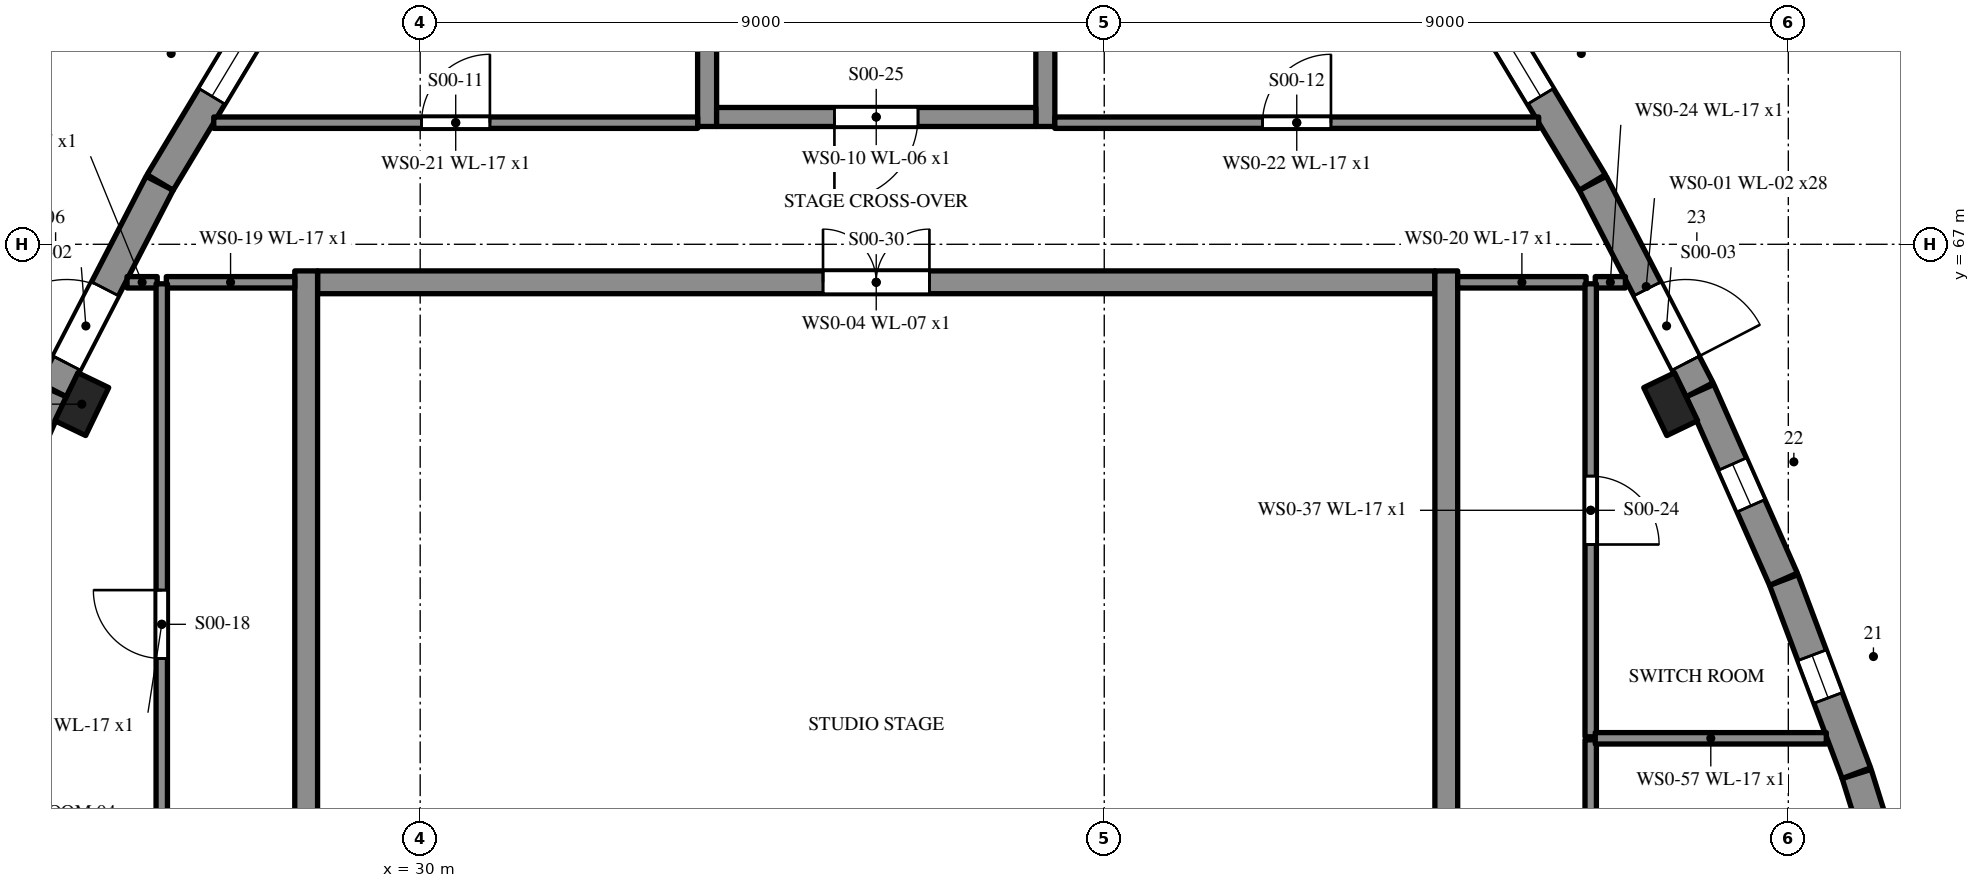
"""IFC4 building model, lengths in metres.
Left out: names, types, materials, properties, quantities, classifications, styles, units other than length and angle.
Written with IfcOpenShell. Run it as: python <this file> out.ifc"""

import sys

from ifc_helpers import new_model, si_unit, direction, frame, frame_2d, origin, origin_2d, place, context, subcontext, project, spatial, rectangle, extrude, element, fill, save


model = new_model("IFC4")
c1 = context("Model", 3, precision=1e-05, world=origin(), true_north=direction((0.0, 1.0)))
c2 = subcontext(c1, "Body", "Model", "MODEL_VIEW")
j1 = project(units=[si_unit("LENGTHUNIT", "METRE"), si_unit("PLANEANGLEUNIT", "RADIAN")], contexts=[c1])
p1 = place(None, origin())
s1 = spatial("IfcSite", under=j1, at=p1, CompositionType="ELEMENT")
p2 = place(p1, origin())
s2 = spatial("IfcBuilding", under=s1, at=p2, CompositionType="ELEMENT")
p3 = place(p2, origin())
s3 = spatial("IfcBuildingStorey", under=s2, at=p3, CompositionType="ELEMENT", Elevation=0.0)
p4 = place(p3, frame((49.708, 57.44, 0.0), z_axis=(0.0, 0.0, 1.0), x_axis=(-0.29795748067, 0.954579142718, 0.0)))
e1 = element("IfcWall", 1, at=p4, inside=s3, PredefinedType="SOLIDWALL", context=c2, shape_type="SweptSolid", body=[
    extrude(rectangle(XDim=2.715, YDim=0.4, at=frame_2d((1.357, 0.0))), origin(), (0.0, 0.0, 1.0), 5.1),
])
p5 = place(p4, frame((0.607, 0.0, 2.4)))
e2 = element("IfcOpeningElement", 2, at=p5, cuts=e1, PredefinedType="OPENING", context=c2, shape_type="SweptSolid", body=[
    extrude(rectangle(XDim=1.5, YDim=0.9, at=frame_2d((0.75, 0.45))), frame((0.0, 0.21, 0.0), z_axis=(0.0, -1.0, 0.0), x_axis=(1.0, 0.0, 0.0)), (0.0, 0.0, 1.0), 0.42),
])
p6 = place(p3, frame((48.896, 60.042, 0.0), z_axis=(0.0, 0.0, 1.0), x_axis=(-0.351862601417, 0.936051659752, 0.0)))
e3 = element("IfcWall", 3, at=p6, inside=s3, PredefinedType="SOLIDWALL", context=c2, shape_type="SweptSolid", body=[
    extrude(rectangle(XDim=2.714, YDim=0.4, at=frame_2d((1.357, 0.0))), origin(), (0.0, 0.0, 1.0), 5.1),
])
p7 = place(p6, frame((1.057, 0.0, 2.4)))
e4 = element("IfcOpeningElement", 4, at=p7, cuts=e3, PredefinedType="OPENING", context=c2, shape_type="SweptSolid", body=[
    extrude(rectangle(XDim=0.6, YDim=0.6, at=frame_2d((0.3, 0.3))), frame((0.0, 0.21, 0.0), z_axis=(0.0, -1.0, 0.0), x_axis=(1.0, 0.0, 0.0)), (0.0, 0.0, 1.0), 0.42),
])
p8 = place(p3, frame((47.936, 62.593, 0.0), z_axis=(0.0, 0.0, 1.0), x_axis=(-0.404652153757, 0.914470685402, 0.0)))
e5 = element("IfcWall", 5, at=p8, inside=s3, PredefinedType="SOLIDWALL", context=c2, shape_type="SweptSolid", body=[
    extrude(rectangle(XDim=2.714, YDim=0.4, at=frame_2d((1.357, 0.0))), origin(), (0.0, 0.0, 1.0), 5.1),
])
p9 = place(p8, frame((1.057, 0.0, 2.4)))
e6 = element("IfcOpeningElement", 6, at=p9, cuts=e5, PredefinedType="OPENING", context=c2, shape_type="SweptSolid", body=[
    extrude(rectangle(XDim=0.6, YDim=0.6, at=frame_2d((0.3, 0.3))), frame((0.0, 0.21, 0.0), z_axis=(0.0, -1.0, 0.0), x_axis=(1.0, 0.0, 0.0)), (0.0, 0.0, 1.0), 0.42),
])
p10 = place(p3, frame((46.833, 65.086, 0.0), z_axis=(0.0, 0.0, 1.0), x_axis=(-0.45930565039, 0.888278289457, 0.0)))
e7 = element("IfcWall", 7, at=p10, inside=s3, PredefinedType="SOLIDWALL", context=c2, shape_type="SweptSolid", body=[
    extrude(rectangle(XDim=3.059, YDim=0.4, at=frame_2d((1.529, 0.0))), origin(), (0.0, 0.0, 1.0), 5.1),
])
p11 = place(p10, frame((0.396, 0.0, 0.0)))
e8 = element("IfcOpeningElement", 8, at=p11, cuts=e7, PredefinedType="OPENING", context=c2, shape_type="SweptSolid", body=[
    extrude(rectangle(XDim=1.1, YDim=2.1, at=frame_2d((0.55, 1.05))), frame((0.0, 0.21, 0.0), z_axis=(0.0, -1.0, 0.0), x_axis=(1.0, 0.0, 0.0)), (0.0, 0.0, 1.0), 0.42),
])
p12 = place(p3, frame((45.422, 67.814, 0.0), z_axis=(0.0, 0.0, 1.0), x_axis=(-0.515387841983, 0.856957042293, 0.0)))
e9 = element("IfcWall", 9, at=p12, inside=s3, PredefinedType="SOLIDWALL", context=c2, shape_type="SweptSolid", body=[
    extrude(rectangle(XDim=3.058, YDim=0.4, at=frame_2d((1.529, 0.0))), origin(), (0.0, 0.0, 1.0), 5.1),
])
p13 = place(p12, frame((1.323, 0.0, 2.4)))
e10 = element("IfcOpeningElement", 10, at=p13, cuts=e9, PredefinedType="OPENING", context=c2, shape_type="SweptSolid", body=[
    extrude(rectangle(XDim=1.5, YDim=0.9, at=frame_2d((0.75, 0.45))), frame((0.0, 0.21, 0.0), z_axis=(0.0, -1.0, 0.0), x_axis=(1.0, 0.0, 0.0)), (0.0, 0.0, 1.0), 0.42),
])
p14 = place(p3, frame((28.154, 70.434, 0.0), z_axis=(0.0, 0.0, 1.0), x_axis=(-0.515387841983, -0.856957042293, 0.0)))
e11 = element("IfcWall", 11, at=p14, inside=s3, PredefinedType="SOLIDWALL", context=c2, shape_type="SweptSolid", body=[
    extrude(rectangle(XDim=3.058, YDim=0.4, at=frame_2d((1.529, 0.0))), origin(), (0.0, 0.0, 1.0), 5.1),
])
p15 = place(p14, frame((0.235, 0.0, 2.4)))
e12 = element("IfcOpeningElement", 12, at=p15, cuts=e11, PredefinedType="OPENING", context=c2, shape_type="SweptSolid", body=[
    extrude(rectangle(XDim=1.5, YDim=0.9, at=frame_2d((0.75, 0.45))), frame((0.0, 0.21, 0.0), z_axis=(0.0, -1.0, 0.0), x_axis=(1.0, 0.0, 0.0)), (0.0, 0.0, 1.0), 0.42),
])
p16 = place(p3, frame((26.572, 67.802, 0.0), z_axis=(0.0, 0.0, 1.0), x_axis=(-0.45930565039, -0.888278289457, 0.0)))
e13 = element("IfcWall", 13, at=p16, inside=s3, PredefinedType="SOLIDWALL", context=c2, shape_type="SweptSolid", body=[
    extrude(rectangle(XDim=3.059, YDim=0.4, at=frame_2d((1.529, 0.0))), origin(), (0.0, 0.0, 1.0), 5.1),
])
p17 = place(p16, frame((1.563, 0.0, 0.0)))
e14 = element("IfcOpeningElement", 14, at=p17, cuts=e13, PredefinedType="OPENING", context=c2, shape_type="SweptSolid", body=[
    extrude(rectangle(XDim=1.1, YDim=2.1, at=frame_2d((0.55, 1.05))), frame((0.0, 0.21, 0.0), z_axis=(0.0, -1.0, 0.0), x_axis=(1.0, 0.0, 0.0)), (0.0, 0.0, 1.0), 0.42),
])
p18 = place(p3, frame((25.162, 65.075, 0.0), z_axis=(0.0, 0.0, 1.0), x_axis=(-0.404652153757, -0.914470685402, 0.0)))
e15 = element("IfcWall", 15, at=p18, inside=s3, PredefinedType="SOLIDWALL", context=c2, shape_type="SweptSolid", body=[
    extrude(rectangle(XDim=2.714, YDim=0.4, at=frame_2d((1.357, 0.0))), origin(), (0.0, 0.0, 1.0), 5.1),
])
p19 = place(p18, frame((0.457, 0.0, 1.2)))
e16 = element("IfcOpeningElement", 16, at=p19, cuts=e15, PredefinedType="OPENING", context=c2, shape_type="SweptSolid", body=[
    extrude(rectangle(XDim=1.8, YDim=1.2, at=frame_2d((0.9, 0.6))), frame((0.0, 0.21, 0.0), z_axis=(0.0, -1.0, 0.0), x_axis=(1.0, 0.0, 0.0)), (0.0, 0.0, 1.0), 0.42),
])
for number, where, z_axis, x_axis in (
    (17, (46.452, 64.896, 0.0), (0.0, 0.0, 1.0), (-0.434, 0.901, 0.0)),
    (18, (25.548, 64.896, 0.0), (0.0, 0.0, 1.0), (-0.434, -0.901, 0.0)),
):
    element("IfcColumn", number, at=place(p3, frame(where, z_axis=z_axis, x_axis=x_axis)), inside=s3, PredefinedType="PILASTER", context=c2, shape_type="SweptSolid", body=[
        extrude(rectangle(XDim=0.7, YDim=0.45, at=origin_2d()), origin(), (0.0, 0.0, 1.0), 5.1),
    ])
p20 = place(p3, frame((28.65, 66.5, 0.0), z_axis=(0.0, 0.0, 1.0), x_axis=(1.0, 0.0, 0.0)))
e19 = element("IfcWall", 19, at=p20, inside=s3, PredefinedType="SHEAR", context=c2, shape_type="SweptSolid", body=[
    extrude(rectangle(XDim=14.7, YDim=0.3, at=frame_2d((7.35, 0.0))), origin(), (0.0, 0.0, 1.0), 5.1),
])
p21 = place(p20, frame((6.65, 0.0, 0.0)))
e20 = element("IfcOpeningElement", 20, at=p21, cuts=e19, PredefinedType="OPENING", context=c2, shape_type="SweptSolid", body=[
    extrude(rectangle(XDim=1.4, YDim=2.1, at=frame_2d((0.7, 1.05))), frame((0.0, 0.16, 0.0), z_axis=(0.0, -1.0, 0.0), x_axis=(1.0, 0.0, 0.0)), (0.0, 0.0, 1.0), 0.32),
])
p22 = place(p3, frame((43.5, 25.35, 0.0), z_axis=(0.0, 0.0, 1.0), x_axis=(0.0, 1.0, 0.0)))
e21 = element("IfcWall", 21, at=p22, inside=s3, PredefinedType="SHEAR", context=c2, shape_type="SweptSolid", body=[
    extrude(rectangle(XDim=41.3, YDim=0.3, at=frame_2d((20.65, 0.0))), origin(), (0.0, 0.0, 1.0), 5.1),
])
p23 = place(p22, frame((8.386, 0.0, 0.0)))
e22 = element("IfcOpeningElement", 22, at=p23, cuts=e21, PredefinedType="OPENING", context=c2, shape_type="SweptSolid", body=[
    extrude(rectangle(XDim=1.4, YDim=2.1, at=frame_2d((0.7, 1.05))), frame((0.0, 0.16, 0.0), z_axis=(0.0, -1.0, 0.0), x_axis=(1.0, 0.0, 0.0)), (0.0, 0.0, 1.0), 0.32),
])
p24 = place(p22, frame((31.514, 0.0, 0.0)))
e23 = element("IfcOpeningElement", 23, at=p24, cuts=e21, PredefinedType="OPENING", context=c2, shape_type="SweptSolid", body=[
    extrude(rectangle(XDim=1.4, YDim=2.1, at=frame_2d((0.7, 1.05))), frame((0.0, 0.16, 0.0), z_axis=(0.0, -1.0, 0.0), x_axis=(1.0, 0.0, 0.0)), (0.0, 0.0, 1.0), 0.32),
])
p25 = place(p3, frame((28.5, 66.65, 0.0), z_axis=(0.0, 0.0, 1.0), x_axis=(0.0, -1.0, 0.0)))
e24 = element("IfcWall", 24, at=p25, inside=s3, PredefinedType="SHEAR", context=c2, shape_type="SweptSolid", body=[
    extrude(rectangle(XDim=41.3, YDim=0.3, at=frame_2d((20.65, 0.0))), origin(), (0.0, 0.0, 1.0), 5.1),
])
p26 = place(p25, frame((8.386, 0.0, 0.0)))
e25 = element("IfcOpeningElement", 25, at=p26, cuts=e24, PredefinedType="OPENING", context=c2, shape_type="SweptSolid", body=[
    extrude(rectangle(XDim=1.4, YDim=2.1, at=frame_2d((0.7, 1.05))), frame((0.0, 0.16, 0.0), z_axis=(0.0, -1.0, 0.0), x_axis=(1.0, 0.0, 0.0)), (0.0, 0.0, 1.0), 0.32),
])
p27 = place(p25, frame((31.514, 0.0, 0.0)))
e26 = element("IfcOpeningElement", 26, at=p27, cuts=e24, PredefinedType="OPENING", context=c2, shape_type="SweptSolid", body=[
    extrude(rectangle(XDim=1.4, YDim=2.1, at=frame_2d((0.7, 1.05))), frame((0.0, 0.16, 0.0), z_axis=(0.0, -1.0, 0.0), x_axis=(1.0, 0.0, 0.0)), (0.0, 0.0, 1.0), 0.32),
])
for number, where, z_axis, x_axis in (
    (27, (38.225, 68.55, 0.0), (0.0, 0.0, 1.0), (0.0, 1.0, 0.0)),
    (28, (33.775, 77.1, 0.0), (0.0, 0.0, 1.0), (0.0, -1.0, 0.0)),
):
    element("IfcWall", number, at=place(p3, frame(where, z_axis=z_axis, x_axis=x_axis)), inside=s3, PredefinedType="SHEAR", context=c2, shape_type="SweptSolid", body=[
        extrude(rectangle(XDim=8.55, YDim=0.25, at=frame_2d((4.275, 0.0))), origin(), (0.0, 0.0, 1.0), 5.4),
    ])
p28 = place(p3, frame((38.1, 68.675, 0.0), z_axis=(0.0, 0.0, 1.0), x_axis=(-1.0, 0.0, 0.0)))
e29 = element("IfcWall", 29, at=p28, inside=s3, PredefinedType="SHEAR", context=c2, shape_type="SweptSolid", body=[
    extrude(rectangle(XDim=4.2, YDim=0.25, at=frame_2d((2.1, 0.0))), origin(), (0.0, 0.0, 1.0), 5.4),
])
p29 = place(p28, frame((1.55, 0.0, 0.0)))
e30 = element("IfcOpeningElement", 30, at=p29, cuts=e29, PredefinedType="OPENING", context=c2, shape_type="SweptSolid", body=[
    extrude(rectangle(XDim=1.1, YDim=2.1, at=frame_2d((0.55, 1.05))), frame((0.0, 0.135, 0.0), z_axis=(0.0, -1.0, 0.0), x_axis=(1.0, 0.0, 0.0)), (0.0, 0.0, 1.0), 0.27),
])
for number, where, z_axis, x_axis in (
    (31, (28.351, 66.5, 0.0), (0.0, 0.0, 1.0), (-1.0, 0.0, 0.0)),
    (32, (45.34, 66.5, 0.0), (0.0, 0.0, 1.0), (-1.0, 0.0, 0.0)),
):
    element("IfcWall", number, at=place(p3, frame(where, z_axis=z_axis, x_axis=x_axis)), inside=s3, PredefinedType="PARTITIONING", context=c2, shape_type="SweptSolid", body=[
        extrude(rectangle(XDim=1.691, YDim=0.15, at=frame_2d((0.845, 0.0))), origin(), (0.0, 0.0, 1.0), 5.1),
    ])
p30 = place(p3, frame((27.284, 68.6, 0.0), z_axis=(0.0, 0.0, 1.0), x_axis=(1.0, 0.0, 0.0)))
e33 = element("IfcWall", 33, at=p30, inside=s3, PredefinedType="PARTITIONING", context=c2, shape_type="SweptSolid", body=[
    extrude(rectangle(XDim=6.366, YDim=0.15, at=frame_2d((3.183, 0.0))), origin(), (0.0, 0.0, 1.0), 5.1),
])
p31 = place(p30, frame((2.733, 0.0, 0.0)))
e34 = element("IfcOpeningElement", 34, at=p31, cuts=e33, PredefinedType="OPENING", context=c2, shape_type="SweptSolid", body=[
    extrude(rectangle(XDim=0.9, YDim=2.1, at=frame_2d((0.45, 1.05))), frame((0.0, 0.085, 0.0), z_axis=(0.0, -1.0, 0.0), x_axis=(1.0, 0.0, 0.0)), (0.0, 0.0, 1.0), 0.17),
])
p32 = place(p3, frame((38.35, 68.6, 0.0), z_axis=(0.0, 0.0, 1.0), x_axis=(1.0, 0.0, 0.0)))
e35 = element("IfcWall", 35, at=p32, inside=s3, PredefinedType="PARTITIONING", context=c2, shape_type="SweptSolid", body=[
    extrude(rectangle(XDim=6.366, YDim=0.15, at=frame_2d((3.183, 0.0))), origin(), (0.0, 0.0, 1.0), 5.1),
])
p33 = place(p32, frame((2.733, 0.0, 0.0)))
e36 = element("IfcOpeningElement", 36, at=p33, cuts=e35, PredefinedType="OPENING", context=c2, shape_type="SweptSolid", body=[
    extrude(rectangle(XDim=0.9, YDim=2.1, at=frame_2d((0.45, 1.05))), frame((0.0, 0.085, 0.0), z_axis=(0.0, -1.0, 0.0), x_axis=(1.0, 0.0, 0.0)), (0.0, 0.0, 1.0), 0.17),
])
for number, where, z_axis, x_axis in (
    (37, (26.54, 66.5, 0.0), (0.0, 0.0, 1.0), (-1.0, 0.0, 0.0)),
    (38, (45.857, 66.5, 0.0), (0.0, 0.0, 1.0), (-1.0, 0.0, 0.0)),
):
    element("IfcWall", number, at=place(p3, frame(where, z_axis=z_axis, x_axis=x_axis)), inside=s3, PredefinedType="PARTITIONING", context=c2, shape_type="SweptSolid", body=[
        extrude(rectangle(XDim=0.397, YDim=0.15, at=frame_2d((0.198, 0.0))), origin(), (0.0, 0.0, 1.0), 5.1),
    ])
p34 = place(p3, frame((26.6, 57.52, 0.0), z_axis=(0.0, 0.0, 1.0), x_axis=(0.0, 1.0, 0.0)))
e39 = element("IfcWall", 39, at=p34, inside=s3, PredefinedType="PARTITIONING", context=c2, shape_type="SweptSolid", body=[
    extrude(rectangle(XDim=8.96, YDim=0.15, at=frame_2d((4.48, 0.0))), origin(), (0.0, 0.0, 1.0), 5.1),
])
p35 = place(p34, frame((4.03, 0.0, 0.0)))
e40 = element("IfcOpeningElement", 40, at=p35, cuts=e39, PredefinedType="OPENING", context=c2, shape_type="SweptSolid", body=[
    extrude(rectangle(XDim=0.9, YDim=2.1, at=frame_2d((0.45, 1.05))), frame((0.0, 0.085, 0.0), z_axis=(0.0, -1.0, 0.0), x_axis=(1.0, 0.0, 0.0)), (0.0, 0.0, 1.0), 0.17),
])
p36 = place(p3, frame((45.4, 60.48, 0.0), z_axis=(0.0, 0.0, 1.0), x_axis=(0.0, -1.0, 0.0)))
e41 = element("IfcWall", 41, at=p36, inside=s3, PredefinedType="PARTITIONING", context=c2, shape_type="SweptSolid", body=[
    extrude(rectangle(XDim=5.96, YDim=0.15, at=frame_2d((2.98, 0.0))), origin(), (0.0, 0.0, 1.0), 5.1),
])
p37 = place(p36, frame((2.53, 0.0, 0.0)))
e42 = element("IfcOpeningElement", 42, at=p37, cuts=e41, PredefinedType="OPENING", context=c2, shape_type="SweptSolid", body=[
    extrude(rectangle(XDim=0.9, YDim=2.1, at=frame_2d((0.45, 1.05))), frame((0.0, 0.085, 0.0), z_axis=(0.0, -1.0, 0.0), x_axis=(1.0, 0.0, 0.0)), (0.0, 0.0, 1.0), 0.17),
])
p38 = place(p3, frame((45.4, 66.48, 0.0), z_axis=(0.0, 0.0, 1.0), x_axis=(0.0, -1.0, 0.0)))
e43 = element("IfcWall", 43, at=p38, inside=s3, PredefinedType="PARTITIONING", context=c2, shape_type="SweptSolid", body=[
    extrude(rectangle(XDim=5.96, YDim=0.15, at=frame_2d((2.98, 0.0))), origin(), (0.0, 0.0, 1.0), 5.1),
])
p39 = place(p38, frame((2.53, 0.0, 0.0)))
e44 = element("IfcOpeningElement", 44, at=p39, cuts=e43, PredefinedType="OPENING", context=c2, shape_type="SweptSolid", body=[
    extrude(rectangle(XDim=0.9, YDim=2.1, at=frame_2d((0.45, 1.05))), frame((0.0, 0.085, 0.0), z_axis=(0.0, -1.0, 0.0), x_axis=(1.0, 0.0, 0.0)), (0.0, 0.0, 1.0), 0.17),
])
p40 = place(p3, frame((45.46, 60.5, 0.0), z_axis=(0.0, 0.0, 1.0), x_axis=(1.0, 0.0, 0.0)))
e45 = element("IfcWall", 45, at=p40, inside=s3, PredefinedType="PARTITIONING", context=c2, shape_type="SweptSolid", body=[
    extrude(rectangle(XDim=3.04, YDim=0.15, at=frame_2d((1.52, 0.0))), origin(), (0.0, 0.0, 1.0), 5.1),
])
p41 = place(p17, frame((1.1, 0.0, 0.0), z_axis=(0.0, 0.0, 1.0), x_axis=(-1.0, 0.0, 0.0)))
e46 = element("IfcDoor", 46, at=p41, inside=s3, OperationType="SINGLE_SWING_LEFT", PredefinedType="DOOR", context=c2, shape_type="SweptSolid", body=[
    extrude(rectangle(XDim=1.1, YDim=2.1, at=frame_2d((0.55, 1.05))), frame((0.0, 0.025, 0.0), z_axis=(0.0, -1.0, 0.0), x_axis=(1.0, 0.0, 0.0)), (0.0, 0.0, 1.0), 0.05),
])
fill(e14, e46)
p42 = place(p11, frame((1.1, 0.0, 0.0), z_axis=(0.0, 0.0, 1.0), x_axis=(-1.0, 0.0, 0.0)))
e47 = element("IfcDoor", 47, at=p42, inside=s3, OperationType="SINGLE_SWING_RIGHT", PredefinedType="DOOR", context=c2, shape_type="SweptSolid", body=[
    extrude(rectangle(XDim=1.1, YDim=2.1, at=frame_2d((0.55, 1.05))), frame((0.0, 0.025, 0.0), z_axis=(0.0, -1.0, 0.0), x_axis=(1.0, 0.0, 0.0)), (0.0, 0.0, 1.0), 0.05),
])
fill(e8, e47)
p43 = place(p7, origin())
e48 = element("IfcWindow", 48, at=p43, inside=s3, PartitioningType="SINGLE_PANEL", PredefinedType="WINDOW", context=c2, shape_type="SweptSolid", body=[
    extrude(rectangle(XDim=0.6, YDim=0.6, at=frame_2d((0.3, 0.3))), frame((0.0, 0.03, 0.0), z_axis=(0.0, -1.0, 0.0), x_axis=(1.0, 0.0, 0.0)), (0.0, 0.0, 1.0), 0.06),
])
fill(e4, e48)
p44 = place(p9, origin())
e49 = element("IfcWindow", 49, at=p44, inside=s3, PartitioningType="SINGLE_PANEL", PredefinedType="WINDOW", context=c2, shape_type="SweptSolid", body=[
    extrude(rectangle(XDim=0.6, YDim=0.6, at=frame_2d((0.3, 0.3))), frame((0.0, 0.03, 0.0), z_axis=(0.0, -1.0, 0.0), x_axis=(1.0, 0.0, 0.0)), (0.0, 0.0, 1.0), 0.06),
])
fill(e6, e49)
p45 = place(p13, origin())
e50 = element("IfcWindow", 50, at=p45, inside=s3, PartitioningType="SINGLE_PANEL", PredefinedType="WINDOW", context=c2, shape_type="SweptSolid", body=[
    extrude(rectangle(XDim=1.5, YDim=0.9, at=frame_2d((0.75, 0.45))), frame((0.0, 0.03, 0.0), z_axis=(0.0, -1.0, 0.0), x_axis=(1.0, 0.0, 0.0)), (0.0, 0.0, 1.0), 0.06),
])
fill(e10, e50)
p46 = place(p15, origin())
e51 = element("IfcWindow", 51, at=p46, inside=s3, PartitioningType="SINGLE_PANEL", PredefinedType="WINDOW", context=c2, shape_type="SweptSolid", body=[
    extrude(rectangle(XDim=1.5, YDim=0.9, at=frame_2d((0.75, 0.45))), frame((0.0, 0.03, 0.0), z_axis=(0.0, -1.0, 0.0), x_axis=(1.0, 0.0, 0.0)), (0.0, 0.0, 1.0), 0.06),
])
fill(e12, e51)
p47 = place(p31, origin())
e52 = element("IfcDoor", 52, at=p47, inside=s3, OperationType="SINGLE_SWING_RIGHT", PredefinedType="DOOR", context=c2, shape_type="SweptSolid", body=[
    extrude(rectangle(XDim=0.9, YDim=2.1, at=frame_2d((0.45, 1.05))), frame((0.0, 0.025, 0.0), z_axis=(0.0, -1.0, 0.0), x_axis=(1.0, 0.0, 0.0)), (0.0, 0.0, 1.0), 0.05),
])
fill(e34, e52)
p48 = place(p33, origin())
e53 = element("IfcDoor", 53, at=p48, inside=s3, OperationType="SINGLE_SWING_RIGHT", PredefinedType="DOOR", context=c2, shape_type="SweptSolid", body=[
    extrude(rectangle(XDim=0.9, YDim=2.1, at=frame_2d((0.45, 1.05))), frame((0.0, 0.025, 0.0), z_axis=(0.0, -1.0, 0.0), x_axis=(1.0, 0.0, 0.0)), (0.0, 0.0, 1.0), 0.05),
])
fill(e36, e53)
p49 = place(p35, origin())
e54 = element("IfcDoor", 54, at=p49, inside=s3, OperationType="SINGLE_SWING_RIGHT", PredefinedType="DOOR", context=c2, shape_type="SweptSolid", body=[
    extrude(rectangle(XDim=0.9, YDim=2.1, at=frame_2d((0.45, 1.05))), frame((0.0, 0.025, 0.0), z_axis=(0.0, -1.0, 0.0), x_axis=(1.0, 0.0, 0.0)), (0.0, 0.0, 1.0), 0.05),
])
fill(e40, e54)
p50 = place(p39, origin())
e55 = element("IfcDoor", 55, at=p50, inside=s3, OperationType="SINGLE_SWING_RIGHT", PredefinedType="DOOR", context=c2, shape_type="SweptSolid", body=[
    extrude(rectangle(XDim=0.9, YDim=2.1, at=frame_2d((0.45, 1.05))), frame((0.0, 0.025, 0.0), z_axis=(0.0, -1.0, 0.0), x_axis=(1.0, 0.0, 0.0)), (0.0, 0.0, 1.0), 0.05),
])
fill(e44, e55)
p51 = place(p29, origin())
e56 = element("IfcDoor", 56, at=p51, inside=s3, OperationType="SINGLE_SWING_RIGHT", PredefinedType="DOOR", context=c2, shape_type="SweptSolid", body=[
    extrude(rectangle(XDim=1.1, YDim=2.1, at=frame_2d((0.55, 1.05))), frame((0.0, 0.025, 0.0), z_axis=(0.0, -1.0, 0.0), x_axis=(1.0, 0.0, 0.0)), (0.0, 0.0, 1.0), 0.05),
])
fill(e30, e56)
p52 = place(p21, origin())
e57 = element("IfcDoor", 57, at=p52, inside=s3, OperationType="DOUBLE_DOOR_SINGLE_SWING", PredefinedType="DOOR", context=c2, shape_type="SweptSolid", body=[
    extrude(rectangle(XDim=1.4, YDim=2.1, at=frame_2d((0.7, 1.05))), frame((0.0, 0.025, 0.0), z_axis=(0.0, -1.0, 0.0), x_axis=(1.0, 0.0, 0.0)), (0.0, 0.0, 1.0), 0.05),
])
fill(e20, e57)
save(model, sys.argv[1])
